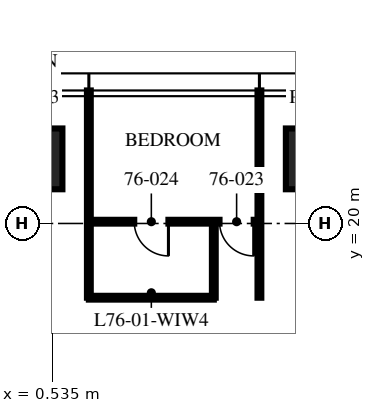
"""IFC4 building model, lengths in metres.
Left out: names, types, materials, properties, quantities, classifications, styles, units other than length and angle.
Written with IfcOpenShell. Run it as: python <this file> out.ifc"""

import sys

from ifc_helpers import new_model, si_unit, direction, frame, frame_2d, origin, origin_2d, place, context, subcontext, project, spatial, rectangle, extrude, element, fill, save


model = new_model("IFC4")
c1 = context("Model", 3, precision=1e-05, world=origin(), true_north=direction((0.0, 1.0)))
c2 = subcontext(c1, "Body", "Model", "MODEL_VIEW")
j1 = project(units=[si_unit("LENGTHUNIT", "METRE"), si_unit("PLANEANGLEUNIT", "RADIAN")], contexts=[c1])
p1 = place(None, origin())
s1 = spatial("IfcSite", under=j1, at=p1, CompositionType="ELEMENT")
p2 = place(p1, origin())
s2 = spatial("IfcBuilding", under=s1, at=p2, CompositionType="ELEMENT")
p3 = place(p2, frame((0.0, 0.0, 304.5)))
s3 = spatial("IfcBuildingStorey", under=s2, at=p3, CompositionType="ELEMENT", Elevation=304.5)
for number, where, z_axis, x_axis in (
    (1, (0.0, 21.7, 0.0), (0.0, 0.0, 1.0), (1.0, 0.0, 0.0)),
    (2, (7.48, 21.7, 0.0), (0.0, 0.0, 1.0), (1.0, 0.0, 0.0)),
):
    element("IfcColumn", number, at=place(p3, frame(where, z_axis=z_axis, x_axis=x_axis)), inside=s3, PredefinedType="COLUMN", context=c2, shape_type="SweptSolid", body=[
        extrude(rectangle(XDim=1.6, YDim=1.6, at=origin_2d()), origin(), (0.0, 0.0, 1.0), 3.75),
    ])
for number, where, z_axis, x_axis in (
    (3, (5.984, 18.046, 0.0), (0.0, 0.0, 1.0), (0.0, 1.0, 0.0)),
    (4, (1.496, 18.046, 0.0), (0.0, 0.0, 1.0), (0.0, 1.0, 0.0)),
):
    element("IfcWall", number, at=place(p3, frame(where, z_axis=z_axis, x_axis=x_axis)), inside=s3, PredefinedType="PARTITIONING", context=c2, shape_type="SweptSolid", body=[
        extrude(rectangle(XDim=5.454, YDim=0.1, at=frame_2d((2.727, 0.0))), origin(), (0.0, 0.0, 1.0), 3.01),
    ])
p4 = place(p3, frame((5.984, 20.046, 0.0), z_axis=(0.0, 0.0, 1.0), x_axis=(-1.0, 0.0, 0.0)))
e5 = element("IfcWall", 5, at=p4, inside=s3, PredefinedType="PARTITIONING", context=c2, shape_type="SweptSolid", body=[
    extrude(rectangle(XDim=4.488, YDim=0.1, at=frame_2d((2.244, 0.0))), origin(), (0.0, 0.0, 1.0), 2.91),
])
p5 = place(p4, frame((0.15, 0.0, 0.0)))
e6 = element("IfcOpeningElement", 6, at=p5, cuts=e5, PredefinedType="OPENING", context=c2, shape_type="SweptSolid", body=[
    extrude(rectangle(XDim=0.9, YDim=2.1, at=frame_2d((0.45, 1.05))), frame((0.0, 0.06, 0.0), z_axis=(0.0, -1.0, 0.0), x_axis=(1.0, 0.0, 0.0)), (0.0, 0.0, 1.0), 0.12),
])
p6 = place(p4, frame((2.394, 0.0, 0.0)))
e7 = element("IfcOpeningElement", 7, at=p6, cuts=e5, PredefinedType="OPENING", context=c2, shape_type="SweptSolid", body=[
    extrude(rectangle(XDim=0.9, YDim=2.1, at=frame_2d((0.45, 1.05))), frame((0.0, 0.06, 0.0), z_axis=(0.0, -1.0, 0.0), x_axis=(1.0, 0.0, 0.0)), (0.0, 0.0, 1.0), 0.12),
])
p7 = place(p3, frame((4.784, 18.046, 0.0), z_axis=(0.0, 0.0, 1.0), x_axis=(0.0, 1.0, 0.0)))
e8 = element("IfcWall", 8, at=p7, inside=s3, PredefinedType="PARTITIONING", context=c2, shape_type="SweptSolid", body=[
    extrude(rectangle(XDim=2.0, YDim=0.1, at=frame_2d((1.0, 0.0))), origin(), (0.0, 0.0, 1.0), 3.5),
])
p8 = place(p3, frame((4.784, 18.046, 0.0), z_axis=(0.0, 0.0, 1.0), x_axis=(-1.0, 0.0, 0.0)))
e9 = element("IfcWall", 9, at=p8, inside=s3, PredefinedType="PARTITIONING", context=c2, shape_type="SweptSolid", body=[
    extrude(rectangle(XDim=3.288, YDim=0.1, at=frame_2d((1.644, 0.0))), origin(), (0.0, 0.0, 1.0), 2.91),
])
p9 = place(p5, origin())
e10 = element("IfcDoor", 10, at=p9, inside=s3, OperationType="SINGLE_SWING_LEFT", PredefinedType="DOOR", context=c2, shape_type="SweptSolid", body=[
    extrude(rectangle(XDim=0.9, YDim=2.1, at=frame_2d((0.45, 1.05))), frame((0.0, 0.025, 0.0), z_axis=(0.0, -1.0, 0.0), x_axis=(1.0, 0.0, 0.0)), (0.0, 0.0, 1.0), 0.05),
])
fill(e6, e10)
p10 = place(p6, origin())
e11 = element("IfcDoor", 11, at=p10, inside=s3, OperationType="SINGLE_SWING_LEFT", PredefinedType="DOOR", context=c2, shape_type="SweptSolid", body=[
    extrude(rectangle(XDim=0.9, YDim=2.1, at=frame_2d((0.45, 1.05))), frame((0.0, 0.025, 0.0), z_axis=(0.0, -1.0, 0.0), x_axis=(1.0, 0.0, 0.0)), (0.0, 0.0, 1.0), 0.05),
])
fill(e7, e11)
save(model, sys.argv[1])
